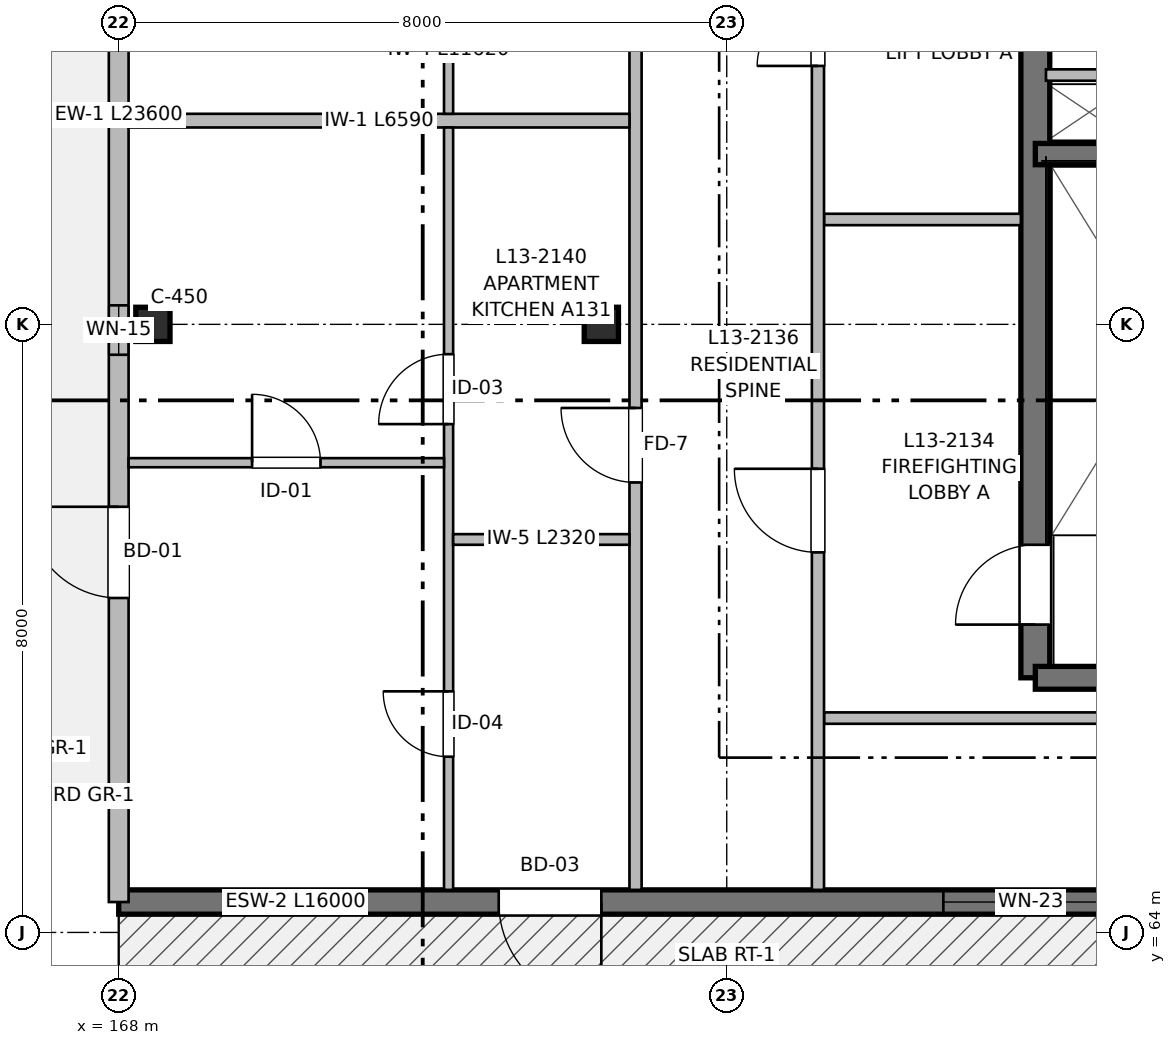
"""IFC4 building model, lengths in metres.
Left out: names, types, materials, properties, quantities, classifications, styles, units other than length and angle.
Written with IfcOpenShell. Run it as: python <this file> out.ifc"""

import sys

from ifc_helpers import new_model, si_unit, direction, frame, frame_2d, origin, origin_2d, place, context, subcontext, project, spatial, rectangle, extrude, element, fill, save


model = new_model("IFC4")
c1 = context("Model", 3, precision=1e-05, world=origin(), true_north=direction((0.0, 1.0)))
c2 = subcontext(c1, "Body", "Model", "MODEL_VIEW")
j1 = project(units=[si_unit("LENGTHUNIT", "METRE"), si_unit("PLANEANGLEUNIT", "RADIAN")], contexts=[c1])
p1 = place(None, origin())
s1 = spatial("IfcSite", under=j1, at=p1, CompositionType="ELEMENT")
p2 = place(p1, origin())
s2 = spatial("IfcBuilding", under=s1, at=p2, CompositionType="ELEMENT")
p3 = place(p2, frame((0.0, 0.0, 42.56)))
s3 = spatial("IfcBuildingStorey", under=s2, at=p3, CompositionType="ELEMENT", Elevation=42.56)
for number, where, z_axis, x_axis in (
    (1, (168.45, 72.0, 0.0), (0.0, 0.0, 1.0), (1.0, 0.0, 0.0)),
    (2, (174.35, 72.0, 0.0), (0.0, 0.0, 1.0), (1.0, 0.0, 0.0)),
):
    element("IfcColumn", number, at=place(p3, frame(where, z_axis=z_axis, x_axis=x_axis)), inside=s3, PredefinedType="COLUMN", context=c2, shape_type="SweptSolid", body=[
        extrude(rectangle(XDim=0.45, YDim=0.45, at=origin_2d()), origin(), (0.0, 0.0, 1.0), 3.2),
    ])
p4 = place(p3, frame((180.06, 67.35, 0.0), z_axis=(0.0, 0.0, 1.0), x_axis=(0.0, 1.0, 0.0)))
e3 = element("IfcWall", 3, at=p4, inside=s3, PredefinedType="SHEAR", context=c2, shape_type="SweptSolid", body=[
    extrude(rectangle(XDim=13.15, YDim=0.38, at=frame_2d((6.575, 0.0))), origin(), (0.0, 0.0, 1.0), 3.2),
])
p5 = place(p4, frame((0.7, 0.0, 0.0)))
e4 = element("IfcOpeningElement", 4, at=p5, cuts=e3, PredefinedType="OPENING", context=c2, shape_type="SweptSolid", body=[
    extrude(rectangle(XDim=1.05, YDim=2.15, at=frame_2d((0.525, 1.075))), frame((0.0, 0.2, 0.0), z_axis=(0.0, -1.0, 0.0), x_axis=(1.0, 0.0, 0.0)), (0.0, 0.0, 1.0), 0.4),
])
p6 = place(p3, frame((183.47, 67.35, 0.0), z_axis=(0.0, 0.0, 1.0), x_axis=(-1.0, 0.0, 0.0)))
e5 = element("IfcWall", 5, at=p6, inside=s3, PredefinedType="SHEAR", context=c2, shape_type="SweptSolid", body=[
    extrude(rectangle(XDim=3.41, YDim=0.3, at=frame_2d((1.705, 0.0))), origin(), (0.0, 0.0, 1.0), 3.2),
])
p7 = place(p3, frame((180.06, 74.24, 0.0), z_axis=(0.0, 0.0, 1.0), x_axis=(1.0, 0.0, 0.0)))
e6 = element("IfcWall", 6, at=p7, inside=s3, PredefinedType="SHEAR", context=c2, shape_type="SweptSolid", body=[
    extrude(rectangle(XDim=3.41, YDim=0.28, at=frame_2d((1.705, 0.0))), origin(), (0.0, 0.0, 1.0), 3.2),
])
p8 = place(p3, frame((180.2, 75.28, 0.0), z_axis=(0.0, 0.0, 1.0), x_axis=(1.0, 0.0, 0.0)))
e7 = element("IfcWall", 7, at=p8, inside=s3, PredefinedType="PARTITIONING", context=c2, shape_type="SweptSolid", body=[
    extrude(rectangle(XDim=1.13, YDim=0.15, at=frame_2d((0.565, 0.0))), origin(), (0.0, 0.0, 1.0), 2.95),
])
p9 = place(p3, frame((184.0, 64.4, 0.0), z_axis=(0.0, 0.0, 1.0), x_axis=(-1.0, 0.0, 0.0)))
e8 = element("IfcWall", 8, at=p9, inside=s3, PredefinedType="SHEAR", context=c2, shape_type="SweptSolid", body=[
    extrude(rectangle(XDim=16.0, YDim=0.32, at=frame_2d((8.0, 0.0))), origin(), (0.0, 0.0, 1.0), 2.98),
])
p10 = place(p9, frame((9.65, 0.0, 0.0)))
e9 = element("IfcOpeningElement", 9, at=p10, cuts=e8, PredefinedType="OPENING", context=c2, shape_type="SweptSolid", body=[
    extrude(rectangle(XDim=1.35, YDim=2.2, at=frame_2d((0.675, 1.1))), frame((0.0, 0.17, 0.0), z_axis=(0.0, -1.0, 0.0), x_axis=(1.0, 0.0, 0.0)), (0.0, 0.0, 1.0), 0.34),
])
p11 = place(p9, frame((2.85, 0.0, 0.57)))
e10 = element("IfcOpeningElement", 10, at=p11, cuts=e8, PredefinedType="OPENING", context=c2, shape_type="SweptSolid", body=[
    extrude(rectangle(XDim=2.3, YDim=1.65, at=frame_2d((1.15, 0.825))), frame((0.0, 0.17, 0.0), z_axis=(0.0, -1.0, 0.0), x_axis=(1.0, 0.0, 0.0)), (0.0, 0.0, 1.0), 0.34),
])
p12 = place(p3, frame((168.0, 64.4, 0.0), z_axis=(0.0, 0.0, 1.0), x_axis=(0.0, 1.0, 0.0)))
e11 = element("IfcWall", 11, at=p12, inside=s3, PredefinedType="SOLIDWALL", context=c2, shape_type="SweptSolid", body=[
    extrude(rectangle(XDim=23.6, YDim=0.26, at=frame_2d((11.8, 0.0))), origin(), (0.0, 0.0, 1.0), 2.98),
])
p13 = place(p12, frame((4.0, 0.0, 0.0)))
e12 = element("IfcOpeningElement", 12, at=p13, cuts=e11, PredefinedType="OPENING", context=c2, shape_type="SweptSolid", body=[
    extrude(rectangle(XDim=1.2, YDim=2.2, at=frame_2d((0.6, 1.1))), frame((0.0, 0.14, 0.0), z_axis=(0.0, -1.0, 0.0), x_axis=(1.0, 0.0, 0.0)), (0.0, 0.0, 1.0), 0.28),
])
p14 = place(p12, frame((7.2, 0.0, 0.9)))
e13 = element("IfcOpeningElement", 13, at=p14, cuts=e11, PredefinedType="OPENING", context=c2, shape_type="SweptSolid", body=[
    extrude(rectangle(XDim=0.65, YDim=0.95, at=frame_2d((0.325, 0.475))), frame((0.0, 0.14, 0.0), z_axis=(0.0, -1.0, 0.0), x_axis=(1.0, 0.0, 0.0)), (0.0, 0.0, 1.0), 0.28),
])
p15 = place(p12, frame((17.425, 0.0, 0.77)))
e14 = element("IfcOpeningElement", 14, at=p15, cuts=e11, PredefinedType="OPENING", context=c2, shape_type="SweptSolid", body=[
    extrude(rectangle(XDim=1.45, YDim=1.45, at=frame_2d((0.725, 0.725))), frame((0.0, 0.14, 0.0), z_axis=(0.0, -1.0, 0.0), x_axis=(1.0, 0.0, 0.0)), (0.0, 0.0, 1.0), 0.28),
])
p16 = place(p12, frame((12.85, 0.0, 0.82)))
e15 = element("IfcOpeningElement", 15, at=p16, cuts=e11, PredefinedType="OPENING", context=c2, shape_type="SweptSolid", body=[
    extrude(rectangle(XDim=1.5, YDim=1.4, at=frame_2d((0.75, 0.7))), frame((0.0, 0.14, 0.0), z_axis=(0.0, -1.0, 0.0), x_axis=(1.0, 0.0, 0.0)), (0.0, 0.0, 1.0), 0.28),
])
p17 = place(p12, frame((22.47, 0.0, 0.9)))
e16 = element("IfcOpeningElement", 16, at=p17, cuts=e11, PredefinedType="OPENING", context=c2, shape_type="SweptSolid", body=[
    extrude(rectangle(XDim=0.65, YDim=0.95, at=frame_2d((0.325, 0.475))), frame((0.0, 0.14, 0.0), z_axis=(0.0, -1.0, 0.0), x_axis=(1.0, 0.0, 0.0)), (0.0, 0.0, 1.0), 0.28),
])
p18 = place(p3, frame((177.28, 66.82, 0.0), z_axis=(0.0, 0.0, 1.0), x_axis=(1.0, 0.0, 0.0)))
e17 = element("IfcWall", 17, at=p18, inside=s3, PredefinedType="PARTITIONING", context=c2, shape_type="SweptSolid", body=[
    extrude(rectangle(XDim=6.59, YDim=0.15, at=frame_2d((3.295, 0.0))), origin(), (0.0, 0.0, 1.0), 2.935),
])
p19 = place(p3, frame((177.28, 73.38, 0.0), z_axis=(0.0, 0.0, 1.0), x_axis=(1.0, 0.0, 0.0)))
e18 = element("IfcWall", 18, at=p19, inside=s3, PredefinedType="PARTITIONING", context=c2, shape_type="SweptSolid", body=[
    extrude(rectangle(XDim=2.59, YDim=0.15, at=frame_2d((1.295, 0.0))), origin(), (0.0, 0.0, 1.0), 2.935),
])
p20 = place(p3, frame((174.8, 64.56, 0.0), z_axis=(0.0, 0.0, 1.0), x_axis=(0.0, 1.0, 0.0)))
e19 = element("IfcWall", 19, at=p20, inside=s3, PredefinedType="PARTITIONING", context=c2, shape_type="SweptSolid", body=[
    extrude(rectangle(XDim=42.24, YDim=0.16, at=frame_2d((21.12, 0.0))), origin(), (0.0, 0.0, 1.0), 2.935),
])
p21 = place(p20, frame((5.36, 0.0, 0.0)))
e20 = element("IfcOpeningElement", 20, at=p21, cuts=e19, PredefinedType="OPENING", context=c2, shape_type="SweptSolid", body=[
    extrude(rectangle(XDim=0.98, YDim=2.15, at=frame_2d((0.49, 1.075))), frame((0.0, 0.09, 0.0), z_axis=(0.0, -1.0, 0.0), x_axis=(1.0, 0.0, 0.0)), (0.0, 0.0, 1.0), 0.18),
])
p22 = place(p20, frame((16.31, 0.0, 0.0)))
e21 = element("IfcOpeningElement", 21, at=p22, cuts=e19, PredefinedType="OPENING", context=c2, shape_type="SweptSolid", body=[
    extrude(rectangle(XDim=1.02, YDim=2.15, at=frame_2d((0.51, 1.075))), frame((0.0, 0.09, 0.0), z_axis=(0.0, -1.0, 0.0), x_axis=(1.0, 0.0, 0.0)), (0.0, 0.0, 1.0), 0.18),
])
p23 = place(p20, frame((27.72, 0.0, 0.0)))
e22 = element("IfcOpeningElement", 22, at=p23, cuts=e19, PredefinedType="OPENING", context=c2, shape_type="SweptSolid", body=[
    extrude(rectangle(XDim=0.98, YDim=2.15, at=frame_2d((0.49, 1.075))), frame((0.0, 0.09, 0.0), z_axis=(0.0, -1.0, 0.0), x_axis=(1.0, 0.0, 0.0)), (0.0, 0.0, 1.0), 0.18),
])
p24 = place(p20, frame((37.95, 0.0, 0.0)))
e23 = element("IfcOpeningElement", 23, at=p24, cuts=e19, PredefinedType="OPENING", context=c2, shape_type="SweptSolid", body=[
    extrude(rectangle(XDim=0.98, YDim=2.15, at=frame_2d((0.49, 1.075))), frame((0.0, 0.09, 0.0), z_axis=(0.0, -1.0, 0.0), x_axis=(1.0, 0.0, 0.0)), (0.0, 0.0, 1.0), 0.18),
])
p25 = place(p3, frame((177.2, 64.56, 0.0), z_axis=(0.0, 0.0, 1.0), x_axis=(0.0, 1.0, 0.0)))
e24 = element("IfcWall", 24, at=p25, inside=s3, PredefinedType="PARTITIONING", context=c2, shape_type="SweptSolid", body=[
    extrude(rectangle(XDim=42.24, YDim=0.16, at=frame_2d((21.12, 0.0))), origin(), (0.0, 0.0, 1.0), 2.935),
])
p26 = place(p25, frame((4.44, 0.0, 0.0)))
e25 = element("IfcOpeningElement", 25, at=p26, cuts=e24, PredefinedType="OPENING", context=c2, shape_type="SweptSolid", body=[
    extrude(rectangle(XDim=1.1, YDim=2.15, at=frame_2d((0.55, 1.075))), frame((0.0, 0.09, 0.0), z_axis=(0.0, -1.0, 0.0), x_axis=(1.0, 0.0, 0.0)), (0.0, 0.0, 1.0), 0.18),
])
p27 = place(p25, frame((10.84, 0.0, 0.0)))
e26 = element("IfcOpeningElement", 26, at=p27, cuts=e24, PredefinedType="OPENING", context=c2, shape_type="SweptSolid", body=[
    extrude(rectangle(XDim=1.6, YDim=2.15, at=frame_2d((0.8, 1.075))), frame((0.0, 0.09, 0.0), z_axis=(0.0, -1.0, 0.0), x_axis=(1.0, 0.0, 0.0)), (0.0, 0.0, 1.0), 0.18),
])
p28 = place(p25, frame((24.47, 0.0, 0.0)))
e27 = element("IfcOpeningElement", 27, at=p28, cuts=e24, PredefinedType="OPENING", context=c2, shape_type="SweptSolid", body=[
    extrude(rectangle(XDim=0.98, YDim=2.15, at=frame_2d((0.49, 1.075))), frame((0.0, 0.09, 0.0), z_axis=(0.0, -1.0, 0.0), x_axis=(1.0, 0.0, 0.0)), (0.0, 0.0, 1.0), 0.18),
])
p29 = place(p25, frame((32.73, 0.0, 0.0)))
e28 = element("IfcOpeningElement", 28, at=p29, cuts=e24, PredefinedType="OPENING", context=c2, shape_type="SweptSolid", body=[
    extrude(rectangle(XDim=0.98, YDim=2.15, at=frame_2d((0.49, 1.075))), frame((0.0, 0.09, 0.0), z_axis=(0.0, -1.0, 0.0), x_axis=(1.0, 0.0, 0.0)), (0.0, 0.0, 1.0), 0.18),
])
p30 = place(p3, frame((168.13, 74.68, 0.0), z_axis=(0.0, 0.0, 1.0), x_axis=(1.0, 0.0, 0.0)))
e29 = element("IfcWall", 29, at=p30, inside=s3, PredefinedType="PARTITIONING", context=c2, shape_type="SweptSolid", body=[
    extrude(rectangle(XDim=6.59, YDim=0.18, at=frame_2d((3.295, 0.0))), origin(), (0.0, 0.0, 1.0), 2.935),
])
p31 = place(p3, frame((172.34, 64.56, 0.0), z_axis=(0.0, 0.0, 1.0), x_axis=(0.0, 1.0, 0.0)))
e30 = element("IfcWall", 30, at=p31, inside=s3, PredefinedType="PARTITIONING", context=c2, shape_type="SweptSolid", body=[
    extrude(rectangle(XDim=10.03, YDim=0.12, at=frame_2d((5.015, 0.0))), origin(), (0.0, 0.0, 1.0), 2.935),
])
p32 = place(p31, frame((1.752, 0.0, 0.0)))
e31 = element("IfcOpeningElement", 31, at=p32, cuts=e30, PredefinedType="OPENING", context=c2, shape_type="SweptSolid", body=[
    extrude(rectangle(XDim=0.86, YDim=2.1, at=frame_2d((0.43, 1.05))), frame((0.0, 0.07, 0.0), z_axis=(0.0, -1.0, 0.0), x_axis=(1.0, 0.0, 0.0)), (0.0, 0.0, 1.0), 0.14),
])
p33 = place(p31, frame((6.128, 0.0, 0.0)))
e32 = element("IfcOpeningElement", 32, at=p33, cuts=e30, PredefinedType="OPENING", context=c2, shape_type="SweptSolid", body=[
    extrude(rectangle(XDim=0.92, YDim=2.1, at=frame_2d((0.46, 1.05))), frame((0.0, 0.07, 0.0), z_axis=(0.0, -1.0, 0.0), x_axis=(1.0, 0.0, 0.0)), (0.0, 0.0, 1.0), 0.14),
])
p34 = place(p3, frame((172.4, 69.17, 0.0), z_axis=(0.0, 0.0, 1.0), x_axis=(1.0, 0.0, 0.0)))
e33 = element("IfcWall", 33, at=p34, inside=s3, PredefinedType="PARTITIONING", context=c2, shape_type="SweptSolid", body=[
    extrude(rectangle(XDim=2.32, YDim=0.14, at=frame_2d((1.16, 0.0))), origin(), (0.0, 0.0, 1.0), 2.935),
])
p35 = place(p3, frame((168.13, 70.18, 0.0), z_axis=(0.0, 0.0, 1.0), x_axis=(1.0, 0.0, 0.0)))
e34 = element("IfcWall", 34, at=p35, inside=s3, PredefinedType="PARTITIONING", context=c2, shape_type="SweptSolid", body=[
    extrude(rectangle(XDim=4.15, YDim=0.12, at=frame_2d((2.075, 0.0))), origin(), (0.0, 0.0, 1.0), 2.935),
])
p36 = place(p35, frame((1.625, 0.0, 0.0)))
e35 = element("IfcOpeningElement", 35, at=p36, cuts=e34, PredefinedType="OPENING", context=c2, shape_type="SweptSolid", body=[
    extrude(rectangle(XDim=0.9, YDim=2.1, at=frame_2d((0.45, 1.05))), frame((0.0, 0.07, 0.0), z_axis=(0.0, -1.0, 0.0), x_axis=(1.0, 0.0, 0.0)), (0.0, 0.0, 1.0), 0.14),
])
p37 = place(p3, frame((172.34, 74.77, 0.0), z_axis=(0.0, 0.0, 1.0), x_axis=(0.0, 1.0, 0.0)))
e36 = element("IfcWall", 36, at=p37, inside=s3, PredefinedType="PARTITIONING", context=c2, shape_type="SweptSolid", body=[
    extrude(rectangle(XDim=11.62, YDim=0.12, at=frame_2d((5.81, 0.0))), origin(), (0.0, 0.0, 1.0), 2.935),
])
p38 = place(p37, frame((2.033, 0.0, 0.0)))
e37 = element("IfcOpeningElement", 37, at=p38, cuts=e36, PredefinedType="OPENING", context=c2, shape_type="SweptSolid", body=[
    extrude(rectangle(XDim=0.94, YDim=2.1, at=frame_2d((0.47, 1.05))), frame((0.0, 0.07, 0.0), z_axis=(0.0, -1.0, 0.0), x_axis=(1.0, 0.0, 0.0)), (0.0, 0.0, 1.0), 0.14),
])
p39 = place(p37, frame((7.106, 0.0, 0.0)))
e38 = element("IfcOpeningElement", 38, at=p39, cuts=e36, PredefinedType="OPENING", context=c2, shape_type="SweptSolid", body=[
    extrude(rectangle(XDim=0.92, YDim=2.1, at=frame_2d((0.46, 1.05))), frame((0.0, 0.07, 0.0), z_axis=(0.0, -1.0, 0.0), x_axis=(1.0, 0.0, 0.0)), (0.0, 0.0, 1.0), 0.14),
])
p40 = place(p5, origin())
e39 = element("IfcDoor", 39, at=p40, inside=s3, OperationType="SINGLE_SWING_LEFT", PredefinedType="DOOR", context=c2, shape_type="SweptSolid", body=[
    extrude(rectangle(XDim=1.05, YDim=2.15, at=frame_2d((0.525, 1.075))), frame((0.0, 0.025, 0.0), z_axis=(0.0, -1.0, 0.0), x_axis=(1.0, 0.0, 0.0)), (0.0, 0.0, 1.0), 0.05),
])
fill(e4, e39)
p41 = place(p10, origin())
e40 = element("IfcDoor", 40, at=p41, inside=s3, OperationType="SINGLE_SWING_LEFT", PredefinedType="DOOR", context=c2, shape_type="SweptSolid", body=[
    extrude(rectangle(XDim=1.35, YDim=2.2, at=frame_2d((0.675, 1.1))), frame((0.0, 0.025, 0.0), z_axis=(0.0, -1.0, 0.0), x_axis=(1.0, 0.0, 0.0)), (0.0, 0.0, 1.0), 0.05),
])
fill(e9, e40)
p42 = place(p11, origin())
e41 = element("IfcWindow", 41, at=p42, inside=s3, PartitioningType="SINGLE_PANEL", PredefinedType="WINDOW", context=c2, shape_type="SweptSolid", body=[
    extrude(rectangle(XDim=2.3, YDim=1.65, at=frame_2d((1.15, 0.825))), frame((0.0, 0.03, 0.0), z_axis=(0.0, -1.0, 0.0), x_axis=(1.0, 0.0, 0.0)), (0.0, 0.0, 1.0), 0.06),
])
fill(e10, e41)
p43 = place(p13, origin())
e42 = element("IfcDoor", 42, at=p43, inside=s3, OperationType="SINGLE_SWING_RIGHT", PredefinedType="DOOR", context=c2, shape_type="SweptSolid", body=[
    extrude(rectangle(XDim=1.2, YDim=2.2, at=frame_2d((0.6, 1.1))), frame((0.0, 0.025, 0.0), z_axis=(0.0, -1.0, 0.0), x_axis=(1.0, 0.0, 0.0)), (0.0, 0.0, 1.0), 0.05),
])
fill(e12, e42)
p44 = place(p14, origin())
e43 = element("IfcWindow", 43, at=p44, inside=s3, PartitioningType="SINGLE_PANEL", PredefinedType="WINDOW", context=c2, shape_type="SweptSolid", body=[
    extrude(rectangle(XDim=0.65, YDim=0.95, at=frame_2d((0.325, 0.475))), frame((0.0, 0.03, 0.0), z_axis=(0.0, -1.0, 0.0), x_axis=(1.0, 0.0, 0.0)), (0.0, 0.0, 1.0), 0.06),
])
fill(e13, e43)
p45 = place(p26, origin())
e44 = element("IfcDoor", 44, at=p45, inside=s3, OperationType="SINGLE_SWING_RIGHT", PredefinedType="DOOR", context=c2, shape_type="SweptSolid", body=[
    extrude(rectangle(XDim=1.1, YDim=2.15, at=frame_2d((0.55, 1.075))), frame((0.0, 0.025, 0.0), z_axis=(0.0, -1.0, 0.0), x_axis=(1.0, 0.0, 0.0)), (0.0, 0.0, 1.0), 0.05),
])
fill(e25, e44)
p46 = place(p27, origin())
e45 = element("IfcDoor", 45, at=p46, inside=s3, OperationType="DOUBLE_DOOR_SINGLE_SWING", PredefinedType="DOOR", context=c2, shape_type="SweptSolid", body=[
    extrude(rectangle(XDim=1.6, YDim=2.15, at=frame_2d((0.8, 1.075))), frame((0.0, 0.025, 0.0), z_axis=(0.0, -1.0, 0.0), x_axis=(1.0, 0.0, 0.0)), (0.0, 0.0, 1.0), 0.05),
])
fill(e26, e45)
p47 = place(p32, origin())
e46 = element("IfcDoor", 46, at=p47, inside=s3, OperationType="SINGLE_SWING_RIGHT", PredefinedType="DOOR", context=c2, shape_type="SweptSolid", body=[
    extrude(rectangle(XDim=0.86, YDim=2.1, at=frame_2d((0.43, 1.05))), frame((0.0, 0.025, 0.0), z_axis=(0.0, -1.0, 0.0), x_axis=(1.0, 0.0, 0.0)), (0.0, 0.0, 1.0), 0.05),
])
fill(e31, e46)
p48 = place(p33, origin())
e47 = element("IfcDoor", 47, at=p48, inside=s3, OperationType="SINGLE_SWING_LEFT", PredefinedType="DOOR", context=c2, shape_type="SweptSolid", body=[
    extrude(rectangle(XDim=0.92, YDim=2.1, at=frame_2d((0.46, 1.05))), frame((0.0, 0.025, 0.0), z_axis=(0.0, -1.0, 0.0), x_axis=(1.0, 0.0, 0.0)), (0.0, 0.0, 1.0), 0.05),
])
fill(e32, e47)
p49 = place(p21, origin())
e48 = element("IfcDoor", 48, at=p49, inside=s3, OperationType="SINGLE_SWING_RIGHT", PredefinedType="DOOR", context=c2, shape_type="SweptSolid", body=[
    extrude(rectangle(XDim=0.98, YDim=2.15, at=frame_2d((0.49, 1.075))), frame((0.0, 0.025, 0.0), z_axis=(0.0, -1.0, 0.0), x_axis=(1.0, 0.0, 0.0)), (0.0, 0.0, 1.0), 0.05),
])
fill(e20, e48)
p50 = place(p36, origin())
e49 = element("IfcDoor", 49, at=p50, inside=s3, OperationType="SINGLE_SWING_LEFT", PredefinedType="DOOR", context=c2, shape_type="SweptSolid", body=[
    extrude(rectangle(XDim=0.9, YDim=2.1, at=frame_2d((0.45, 1.05))), frame((0.0, 0.025, 0.0), z_axis=(0.0, -1.0, 0.0), x_axis=(1.0, 0.0, 0.0)), (0.0, 0.0, 1.0), 0.05),
])
fill(e35, e49)
save(model, sys.argv[1])
